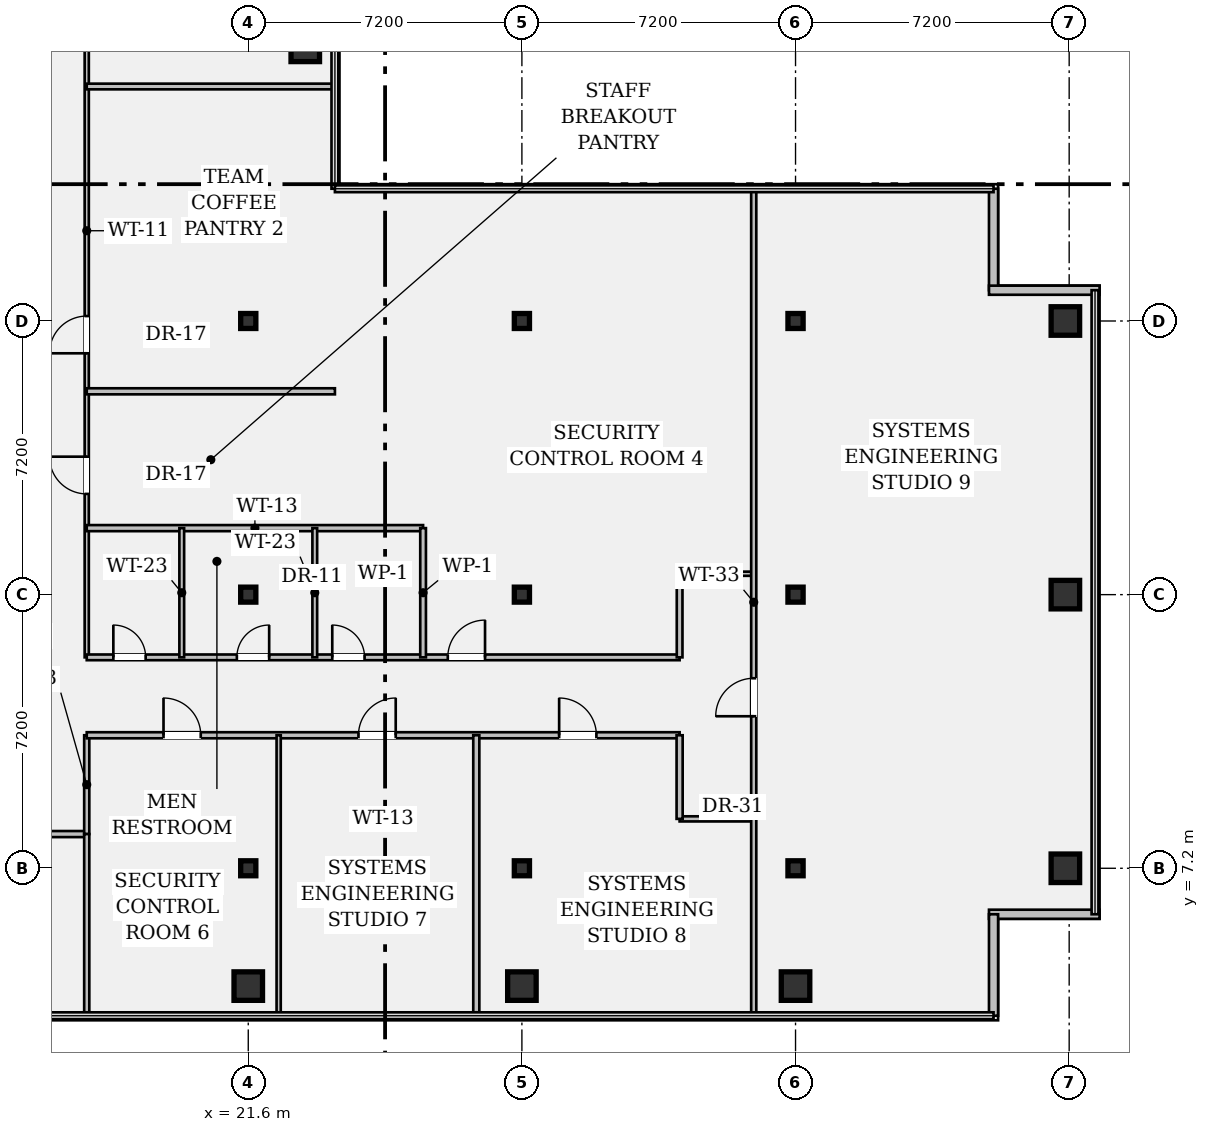
"""IFC4 building model, lengths in metres.
Left out: names, types, materials, properties, quantities, classifications, styles, units other than length and angle.
Written with IfcOpenShell. Run it as: python <this file> out.ifc"""

import sys

from ifc_helpers import new_model, si_unit, direction, frame, frame_2d, origin, origin_2d, place, context, subcontext, project, spatial, rectangle, hollow_rectangle, i_section, extrude, element, fill, save


model = new_model("IFC4")
c1 = context("Model", 3, precision=1e-05, world=origin(), true_north=direction((0.0, 1.0)))
c2 = subcontext(c1, "Body", "Model", "MODEL_VIEW")
j1 = project(units=[si_unit("LENGTHUNIT", "METRE"), si_unit("PLANEANGLEUNIT", "RADIAN")], contexts=[c1])
p1 = place(None, origin())
s1 = spatial("IfcSite", under=j1, at=p1, CompositionType="ELEMENT")
p2 = place(p1, origin())
s2 = spatial("IfcBuilding", under=s1, at=p2, CompositionType="ELEMENT")
p3 = place(p2, frame((0.0, 0.0, 218.75)))
s3 = spatial("IfcBuildingStorey", under=s2, at=p3, CompositionType="ELEMENT", Elevation=218.75)
p4 = place(p3, frame((21.6, 4.1, 0.0), z_axis=(0.0, 0.0, 1.0), x_axis=(1.0, 0.0, 0.0)))
e1 = element("IfcColumn", 1, at=p4, inside=s3, PredefinedType="COLUMN", context=c2, shape_type="SweptSolid", body=[
    extrude(hollow_rectangle(XDim=0.75, YDim=0.75, WallThickness=0.045, at=origin_2d()), origin(), (0.0, 0.0, 1.0), 3.24),
])
for number, where, z_axis, x_axis in (
    (2, (21.6, 7.2, 0.0), (0.0, 0.0, 1.0), (1.0, 0.0, 0.0)),
    (3, (21.6, 14.4, 0.0), (0.0, 0.0, 1.0), (1.0, 0.0, 0.0)),
    (4, (21.6, 21.6, 0.0), (0.0, 0.0, 1.0), (1.0, 0.0, 0.0)),
):
    element("IfcColumn", number, at=place(p3, frame(where, z_axis=z_axis, x_axis=x_axis)), inside=s3, PredefinedType="COLUMN", context=c2, shape_type="SweptSolid", body=[
        extrude(i_section(OverallWidth=0.399, OverallDepth=0.394, WebThickness=0.023, FlangeThickness=0.037, FilletRadius=0.018, at=origin_2d()), origin(), (0.0, 0.0, 1.0), 3.24),
    ])
for number, where, z_axis, x_axis in (
    (5, (23.1, 28.8, 0.0), (0.0, 0.0, 1.0), (1.0, 0.0, 0.0)),
    (6, (28.8, 4.1, 0.0), (0.0, 0.0, 1.0), (1.0, 0.0, 0.0)),
):
    element("IfcColumn", number, at=place(p3, frame(where, z_axis=z_axis, x_axis=x_axis)), inside=s3, PredefinedType="COLUMN", context=c2, shape_type="SweptSolid", body=[
        extrude(hollow_rectangle(XDim=0.75, YDim=0.75, WallThickness=0.045, at=origin_2d()), origin(), (0.0, 0.0, 1.0), 3.24),
    ])
for number, where, z_axis, x_axis in (
    (7, (28.8, 7.2, 0.0), (0.0, 0.0, 1.0), (1.0, 0.0, 0.0)),
    (8, (28.8, 14.4, 0.0), (0.0, 0.0, 1.0), (1.0, 0.0, 0.0)),
    (9, (28.8, 21.6, 0.0), (0.0, 0.0, 1.0), (1.0, 0.0, 0.0)),
):
    element("IfcColumn", number, at=place(p3, frame(where, z_axis=z_axis, x_axis=x_axis)), inside=s3, PredefinedType="COLUMN", context=c2, shape_type="SweptSolid", body=[
        extrude(i_section(OverallWidth=0.399, OverallDepth=0.394, WebThickness=0.023, FlangeThickness=0.037, FilletRadius=0.018, at=origin_2d()), origin(), (0.0, 0.0, 1.0), 3.24),
    ])
p5 = place(p3, frame((36.0, 4.1, 0.0), z_axis=(0.0, 0.0, 1.0), x_axis=(1.0, 0.0, 0.0)))
e10 = element("IfcColumn", 10, at=p5, inside=s3, PredefinedType="COLUMN", context=c2, shape_type="SweptSolid", body=[
    extrude(hollow_rectangle(XDim=0.75, YDim=0.75, WallThickness=0.045, at=origin_2d()), origin(), (0.0, 0.0, 1.0), 3.24),
])
for number, where, z_axis, x_axis in (
    (11, (36.0, 7.2, 0.0), (0.0, 0.0, 1.0), (1.0, 0.0, 0.0)),
    (12, (36.0, 14.4, 0.0), (0.0, 0.0, 1.0), (1.0, 0.0, 0.0)),
    (13, (36.0, 21.6, 0.0), (0.0, 0.0, 1.0), (1.0, 0.0, 0.0)),
):
    element("IfcColumn", number, at=place(p3, frame(where, z_axis=z_axis, x_axis=x_axis)), inside=s3, PredefinedType="COLUMN", context=c2, shape_type="SweptSolid", body=[
        extrude(i_section(OverallWidth=0.399, OverallDepth=0.394, WebThickness=0.023, FlangeThickness=0.037, FilletRadius=0.018, at=origin_2d()), origin(), (0.0, 0.0, 1.0), 3.24),
    ])
for number, where, z_axis, x_axis in (
    (14, (43.1, 7.2, 0.0), (0.0, 0.0, 1.0), (1.0, 0.0, 0.0)),
    (15, (43.1, 14.4, 0.0), (0.0, 0.0, 1.0), (1.0, 0.0, 0.0)),
    (16, (43.1, 21.6, 0.0), (0.0, 0.0, 1.0), (1.0, 0.0, 0.0)),
):
    element("IfcColumn", number, at=place(p3, frame(where, z_axis=z_axis, x_axis=x_axis)), inside=s3, PredefinedType="COLUMN", context=c2, shape_type="SweptSolid", body=[
        extrude(hollow_rectangle(XDim=0.75, YDim=0.75, WallThickness=0.045, at=origin_2d()), origin(), (0.0, 0.0, 1.0), 3.24),
    ])
p6 = place(p3, frame((41.21, 25.08, 0.0), z_axis=(0.0, 0.0, 1.0), x_axis=(0.0, -1.0, 0.0)))
e17 = element("IfcWall", 17, at=p6, inside=s3, PredefinedType="STANDARD", context=c2, shape_type="SweptSolid", body=[
    extrude(rectangle(XDim=2.67, YDim=0.24, at=frame_2d((1.335, 0.0))), origin(), (0.0, 0.0, 1.0), 3.24),
])
for number, where, z_axis, x_axis in (
    (18, (41.09, 22.41, 0.0), (0.0, 0.0, 1.0), (1.0, 0.0, 0.0)),
    (19, (44.0, 5.99, 0.0), (0.0, 0.0, 1.0), (-1.0, 0.0, 0.0)),
):
    element("IfcWall", number, at=place(p3, frame(where, z_axis=z_axis, x_axis=x_axis)), inside=s3, PredefinedType="STANDARD", context=c2, shape_type="SweptSolid", body=[
        extrude(rectangle(XDim=2.91, YDim=0.24, at=frame_2d((1.455, 0.0))), origin(), (0.0, 0.0, 1.0), 3.24),
    ])
p7 = place(p3, frame((41.21, 5.99, 0.0), z_axis=(0.0, 0.0, 1.0), x_axis=(0.0, -1.0, 0.0)))
e20 = element("IfcWall", 20, at=p7, inside=s3, PredefinedType="STANDARD", context=c2, shape_type="SweptSolid", body=[
    extrude(rectangle(XDim=2.67, YDim=0.24, at=frame_2d((1.335, 0.0))), origin(), (0.0, 0.0, 1.0), 3.24),
])
p8 = place(p3, frame((14.4, 8.1, 0.0), z_axis=(0.0, 0.0, 1.0), x_axis=(1.0, 0.0, 0.0)))
e21 = element("IfcWall", 21, at=p8, inside=s3, PredefinedType="PARTITIONING", context=c2, shape_type="SweptSolid", body=[
    extrude(rectangle(XDim=2.95, YDim=0.16, at=frame_2d((1.475, 0.0))), origin(), (0.0, 0.0, 1.0), 2.808),
])
p9 = place(p8, frame((0.95, 0.0, 0.0)))
e22 = element("IfcOpeningElement", 22, at=p9, cuts=e21, PredefinedType="OPENING", context=c2, shape_type="SweptSolid", body=[
    extrude(rectangle(XDim=0.98, YDim=2.15, at=frame_2d((0.49, 1.075))), frame((0.0, 0.092, 0.0), z_axis=(0.0, -1.0, 0.0), x_axis=(1.0, 0.0, 0.0)), (0.0, 0.0, 1.0), 0.184),
])
p10 = place(p3, frame((17.35, 8.1, 0.0), z_axis=(0.0, 0.0, 1.0), x_axis=(0.0, 1.0, 0.0)))
e23 = element("IfcWall", 23, at=p10, inside=s3, PredefinedType="PARTITIONING", context=c2, shape_type="SweptSolid", body=[
    extrude(rectangle(XDim=2.6, YDim=0.135, at=frame_2d((1.3, 0.0))), origin(), (0.0, 0.0, 1.0), 3.24),
])
p11 = place(p3, frame((17.35, 12.75, 0.0), z_axis=(0.0, 0.0, 1.0), x_axis=(0.0, 1.0, 0.0)))
e24 = element("IfcWall", 24, at=p11, inside=s3, PredefinedType="PARTITIONING", context=c2, shape_type="SweptSolid", body=[
    extrude(rectangle(XDim=22.45, YDim=0.11, at=frame_2d((11.225, 0.0))), origin(), (0.0, 0.0, 1.0), 2.613),
])
p12 = place(p11, frame((4.3, 0.0, 0.0)))
e25 = element("IfcOpeningElement", 25, at=p12, cuts=e24, PredefinedType="OPENING", context=c2, shape_type="SweptSolid", body=[
    extrude(rectangle(XDim=0.98, YDim=2.15, at=frame_2d((0.49, 1.075))), frame((0.0, 0.067, 0.0), z_axis=(0.0, -1.0, 0.0), x_axis=(1.0, 0.0, 0.0)), (0.0, 0.0, 1.0), 0.134),
])
p13 = place(p11, frame((8.0, 0.0, 0.0)))
e26 = element("IfcOpeningElement", 26, at=p13, cuts=e24, PredefinedType="OPENING", context=c2, shape_type="SweptSolid", body=[
    extrude(rectangle(XDim=0.98, YDim=2.15, at=frame_2d((0.49, 1.075))), frame((0.0, 0.067, 0.0), z_axis=(0.0, -1.0, 0.0), x_axis=(1.0, 0.0, 0.0)), (0.0, 0.0, 1.0), 0.134),
])
p14 = place(p11, frame((16.02, 0.0, 0.0)))
e27 = element("IfcOpeningElement", 27, at=p14, cuts=e24, PredefinedType="OPENING", context=c2, shape_type="SweptSolid", body=[
    extrude(rectangle(XDim=0.98, YDim=2.15, at=frame_2d((0.49, 1.075))), frame((0.0, 0.067, 0.0), z_axis=(0.0, -1.0, 0.0), x_axis=(1.0, 0.0, 0.0)), (0.0, 0.0, 1.0), 0.134),
])
p15 = place(p3, frame((17.35, 10.7, 0.0), z_axis=(0.0, 0.0, 1.0), x_axis=(1.0, 0.0, 0.0)))
e28 = element("IfcWall", 28, at=p15, inside=s3, PredefinedType="PARTITIONING", context=c2, shape_type="SweptSolid", body=[
    extrude(rectangle(XDim=15.6, YDim=0.16, at=frame_2d((7.8, 0.0))), origin(), (0.0, 0.0, 1.0), 2.613),
])
p16 = place(p15, frame((2.02, 0.0, 0.0)))
e29 = element("IfcOpeningElement", 29, at=p16, cuts=e28, PredefinedType="OPENING", context=c2, shape_type="SweptSolid", body=[
    extrude(rectangle(XDim=0.98, YDim=2.15, at=frame_2d((0.49, 1.075))), frame((0.0, 0.092, 0.0), z_axis=(0.0, -1.0, 0.0), x_axis=(1.0, 0.0, 0.0)), (0.0, 0.0, 1.0), 0.184),
])
p17 = place(p15, frame((7.15, 0.0, 0.0)))
e30 = element("IfcOpeningElement", 30, at=p17, cuts=e28, PredefinedType="OPENING", context=c2, shape_type="SweptSolid", body=[
    extrude(rectangle(XDim=0.98, YDim=2.15, at=frame_2d((0.49, 1.075))), frame((0.0, 0.092, 0.0), z_axis=(0.0, -1.0, 0.0), x_axis=(1.0, 0.0, 0.0)), (0.0, 0.0, 1.0), 0.184),
])
p18 = place(p15, frame((12.43, 0.0, 0.0)))
e31 = element("IfcOpeningElement", 31, at=p18, cuts=e28, PredefinedType="OPENING", context=c2, shape_type="SweptSolid", body=[
    extrude(rectangle(XDim=0.98, YDim=2.15, at=frame_2d((0.49, 1.075))), frame((0.0, 0.092, 0.0), z_axis=(0.0, -1.0, 0.0), x_axis=(1.0, 0.0, 0.0)), (0.0, 0.0, 1.0), 0.184),
])
p19 = place(p3, frame((17.35, 12.75, 0.0), z_axis=(0.0, 0.0, 1.0), x_axis=(1.0, 0.0, 0.0)))
e32 = element("IfcWall", 32, at=p19, inside=s3, PredefinedType="PARTITIONING", context=c2, shape_type="SweptSolid", body=[
    extrude(rectangle(XDim=15.6, YDim=0.15, at=frame_2d((7.8, 0.0))), origin(), (0.0, 0.0, 1.0), 2.613),
])
p20 = place(p19, frame((0.7, 0.0, 0.0)))
e33 = element("IfcOpeningElement", 33, at=p20, cuts=e32, PredefinedType="OPENING", context=c2, shape_type="SweptSolid", body=[
    extrude(rectangle(XDim=0.85, YDim=2.15, at=frame_2d((0.425, 1.075))), frame((0.0, 0.087, 0.0), z_axis=(0.0, -1.0, 0.0), x_axis=(1.0, 0.0, 0.0)), (0.0, 0.0, 1.0), 0.174),
])
p21 = place(p19, frame((3.95, 0.0, 0.0)))
e34 = element("IfcOpeningElement", 34, at=p21, cuts=e32, PredefinedType="OPENING", context=c2, shape_type="SweptSolid", body=[
    extrude(rectangle(XDim=0.85, YDim=2.15, at=frame_2d((0.425, 1.075))), frame((0.0, 0.087, 0.0), z_axis=(0.0, -1.0, 0.0), x_axis=(1.0, 0.0, 0.0)), (0.0, 0.0, 1.0), 0.174),
])
p22 = place(p19, frame((6.46, 0.0, 0.0)))
e35 = element("IfcOpeningElement", 35, at=p22, cuts=e32, PredefinedType="OPENING", context=c2, shape_type="SweptSolid", body=[
    extrude(rectangle(XDim=0.85, YDim=2.15, at=frame_2d((0.425, 1.075))), frame((0.0, 0.087, 0.0), z_axis=(0.0, -1.0, 0.0), x_axis=(1.0, 0.0, 0.0)), (0.0, 0.0, 1.0), 0.174),
])
p23 = place(p19, frame((9.5, 0.0, 0.0)))
e36 = element("IfcOpeningElement", 36, at=p23, cuts=e32, PredefinedType="OPENING", context=c2, shape_type="SweptSolid", body=[
    extrude(rectangle(XDim=0.98, YDim=2.15, at=frame_2d((0.49, 1.075))), frame((0.0, 0.087, 0.0), z_axis=(0.0, -1.0, 0.0), x_axis=(1.0, 0.0, 0.0)), (0.0, 0.0, 1.0), 0.174),
])
p24 = place(p3, frame((32.95, 8.5, 0.0), z_axis=(0.0, 0.0, 1.0), x_axis=(1.0, 0.0, 0.0)))
e37 = element("IfcWall", 37, at=p24, inside=s3, PredefinedType="PARTITIONING", context=c2, shape_type="SweptSolid", body=[
    extrude(rectangle(XDim=1.95, YDim=0.135, at=frame_2d((0.975, 0.0))), origin(), (0.0, 0.0, 1.0), 2.808),
])
p25 = place(p3, frame((32.95, 14.95, 0.0), z_axis=(0.0, 0.0, 1.0), x_axis=(1.0, 0.0, 0.0)))
e38 = element("IfcWall", 38, at=p25, inside=s3, PredefinedType="PARTITIONING", context=c2, shape_type="SweptSolid", body=[
    extrude(rectangle(XDim=1.95, YDim=0.11, at=frame_2d((0.975, 0.0))), origin(), (0.0, 0.0, 1.0), 2.808),
])
p26 = place(p3, frame((32.95, 8.5, 0.0), z_axis=(0.0, 0.0, 1.0), x_axis=(0.0, 1.0, 0.0)))
e39 = element("IfcWall", 39, at=p26, inside=s3, PredefinedType="PARTITIONING", context=c2, shape_type="SweptSolid", body=[
    extrude(rectangle(XDim=2.2, YDim=0.16, at=frame_2d((1.1, 0.0))), origin(), (0.0, 0.0, 1.0), 3.24),
])
p27 = place(p3, frame((32.95, 12.75, 0.0), z_axis=(0.0, 0.0, 1.0), x_axis=(0.0, 1.0, 0.0)))
e40 = element("IfcWall", 40, at=p27, inside=s3, PredefinedType="PARTITIONING", context=c2, shape_type="SweptSolid", body=[
    extrude(rectangle(XDim=2.2, YDim=0.15, at=frame_2d((1.1, 0.0))), origin(), (0.0, 0.0, 1.0), 2.613),
])
p28 = place(p3, frame((34.9, 3.32, 0.0), z_axis=(0.0, 0.0, 1.0), x_axis=(0.0, 1.0, 0.0)))
e41 = element("IfcWall", 41, at=p28, inside=s3, PredefinedType="PARTITIONING", context=c2, shape_type="SweptSolid", body=[
    extrude(rectangle(XDim=21.76, YDim=0.135, at=frame_2d((10.88, 0.0))), origin(), (0.0, 0.0, 1.0), 2.613),
])
p29 = place(p28, frame((7.88, 0.0, 0.0)))
e42 = element("IfcOpeningElement", 42, at=p29, cuts=e41, PredefinedType="OPENING", context=c2, shape_type="SweptSolid", body=[
    extrude(rectangle(XDim=1.0, YDim=2.15, at=frame_2d((0.5, 1.075))), frame((0.0, 0.08, 0.0), z_axis=(0.0, -1.0, 0.0), x_axis=(1.0, 0.0, 0.0)), (0.0, 0.0, 1.0), 0.159),
])
p30 = place(p3, frame((17.35, 16.15, 0.0), z_axis=(0.0, 0.0, 1.0), x_axis=(1.0, 0.0, 0.0)))
e43 = element("IfcWall", 43, at=p30, inside=s3, PredefinedType="PARTITIONING", context=c2, shape_type="SweptSolid", body=[
    extrude(rectangle(XDim=8.85, YDim=0.16, at=frame_2d((4.425, 0.0))), origin(), (0.0, 0.0, 1.0), 2.613),
])
p31 = place(p3, frame((26.2, 12.75, 0.0), z_axis=(0.0, 0.0, 1.0), x_axis=(0.0, 1.0, 0.0)))
e44 = element("IfcWall", 44, at=p31, inside=s3, PredefinedType="PARTITIONING", context=c2, shape_type="SweptSolid", body=[
    extrude(rectangle(XDim=3.4, YDim=0.15, at=frame_2d((1.7, 0.0))), origin(), (0.0, 0.0, 1.0), 2.613),
])
for number, where, z_axis, x_axis in (
    (45, (19.85, 12.75, 0.0), (0.0, 0.0, 1.0), (0.0, 1.0, 0.0)),
    (46, (23.35, 12.75, 0.0), (0.0, 0.0, 1.0), (0.0, 1.0, 0.0)),
):
    element("IfcWall", number, at=place(p3, frame(where, z_axis=z_axis, x_axis=x_axis)), inside=s3, PredefinedType="PARTITIONING", context=c2, shape_type="SweptSolid", body=[
        extrude(rectangle(XDim=3.4, YDim=0.125, at=frame_2d((1.7, 0.0))), origin(), (0.0, 0.0, 1.0), 2.613),
    ])
p32 = place(p3, frame((17.35, 19.75, 0.0), z_axis=(0.0, 0.0, 1.0), x_axis=(1.0, 0.0, 0.0)))
e47 = element("IfcWall", 47, at=p32, inside=s3, PredefinedType="PARTITIONING", context=c2, shape_type="SweptSolid", body=[
    extrude(rectangle(XDim=6.53, YDim=0.16, at=frame_2d((3.265, 0.0))), origin(), (0.0, 0.0, 1.0), 2.613),
])
p33 = place(p3, frame((17.35, 27.77, 0.0), z_axis=(0.0, 0.0, 1.0), x_axis=(1.0, 0.0, 0.0)))
e48 = element("IfcWall", 48, at=p33, inside=s3, PredefinedType="PARTITIONING", context=c2, shape_type="SweptSolid", body=[
    extrude(rectangle(XDim=6.53, YDim=0.15, at=frame_2d((3.265, 0.0))), origin(), (0.0, 0.0, 1.0), 2.808),
])
p34 = place(p3, frame((17.35, 3.32, 0.0), z_axis=(0.0, 0.0, 1.0), x_axis=(0.0, 1.0, 0.0)))
e49 = element("IfcWall", 49, at=p34, inside=s3, PredefinedType="PARTITIONING", context=c2, shape_type="SweptSolid", body=[
    extrude(rectangle(XDim=4.78, YDim=0.135, at=frame_2d((2.39, 0.0))), origin(), (0.0, 0.0, 1.0), 2.613),
])
p35 = place(p3, frame((22.4, 3.32, 0.0), z_axis=(0.0, 0.0, 1.0), x_axis=(0.0, 1.0, 0.0)))
e50 = element("IfcWall", 50, at=p35, inside=s3, PredefinedType="PARTITIONING", context=c2, shape_type="SweptSolid", body=[
    extrude(rectangle(XDim=7.38, YDim=0.11, at=frame_2d((3.69, 0.0))), origin(), (0.0, 0.0, 1.0), 2.613),
])
p36 = place(p3, frame((27.6, 3.32, 0.0), z_axis=(0.0, 0.0, 1.0), x_axis=(0.0, 1.0, 0.0)))
e51 = element("IfcWall", 51, at=p36, inside=s3, PredefinedType="PARTITIONING", context=c2, shape_type="SweptSolid", body=[
    extrude(rectangle(XDim=7.38, YDim=0.16, at=frame_2d((3.69, 0.0))), origin(), (0.0, 0.0, 1.0), 2.613),
])
p37 = place(p20, origin())
e52 = element("IfcDoor", 52, at=p37, inside=s3, OperationType="SINGLE_SWING_LEFT", PredefinedType="DOOR", context=c2, shape_type="SweptSolid", body=[
    extrude(rectangle(XDim=0.85, YDim=2.15, at=frame_2d((0.425, 1.075))), frame((0.0, 0.025, 0.0), z_axis=(0.0, -1.0, 0.0), x_axis=(1.0, 0.0, 0.0)), (0.0, 0.0, 1.0), 0.05),
])
fill(e33, e52)
p38 = place(p21, origin())
e53 = element("IfcDoor", 53, at=p38, inside=s3, OperationType="SINGLE_SWING_RIGHT", PredefinedType="DOOR", context=c2, shape_type="SweptSolid", body=[
    extrude(rectangle(XDim=0.85, YDim=2.15, at=frame_2d((0.425, 1.075))), frame((0.0, 0.025, 0.0), z_axis=(0.0, -1.0, 0.0), x_axis=(1.0, 0.0, 0.0)), (0.0, 0.0, 1.0), 0.05),
])
fill(e34, e53)
p39 = place(p22, origin())
e54 = element("IfcDoor", 54, at=p39, inside=s3, OperationType="SINGLE_SWING_LEFT", PredefinedType="DOOR", context=c2, shape_type="SweptSolid", body=[
    extrude(rectangle(XDim=0.85, YDim=2.15, at=frame_2d((0.425, 1.075))), frame((0.0, 0.025, 0.0), z_axis=(0.0, -1.0, 0.0), x_axis=(1.0, 0.0, 0.0)), (0.0, 0.0, 1.0), 0.05),
])
fill(e35, e54)
p40 = place(p12, origin())
e55 = element("IfcDoor", 55, at=p40, inside=s3, OperationType="SINGLE_SWING_RIGHT", PredefinedType="DOOR", context=c2, shape_type="SweptSolid", body=[
    extrude(rectangle(XDim=0.98, YDim=2.15, at=frame_2d((0.49, 1.075))), frame((0.0, 0.025, 0.0), z_axis=(0.0, -1.0, 0.0), x_axis=(1.0, 0.0, 0.0)), (0.0, 0.0, 1.0), 0.05),
])
fill(e25, e55)
p41 = place(p13, origin())
e56 = element("IfcDoor", 56, at=p41, inside=s3, OperationType="SINGLE_SWING_LEFT", PredefinedType="DOOR", context=c2, shape_type="SweptSolid", body=[
    extrude(rectangle(XDim=0.98, YDim=2.15, at=frame_2d((0.49, 1.075))), frame((0.0, 0.025, 0.0), z_axis=(0.0, -1.0, 0.0), x_axis=(1.0, 0.0, 0.0)), (0.0, 0.0, 1.0), 0.05),
])
fill(e26, e56)
p42 = place(p23, origin())
e57 = element("IfcDoor", 57, at=p42, inside=s3, OperationType="SINGLE_SWING_RIGHT", PredefinedType="DOOR", context=c2, shape_type="SweptSolid", body=[
    extrude(rectangle(XDim=0.98, YDim=2.15, at=frame_2d((0.49, 1.075))), frame((0.0, 0.025, 0.0), z_axis=(0.0, -1.0, 0.0), x_axis=(1.0, 0.0, 0.0)), (0.0, 0.0, 1.0), 0.05),
])
fill(e36, e57)
p43 = place(p16, origin())
e58 = element("IfcDoor", 58, at=p43, inside=s3, OperationType="SINGLE_SWING_LEFT", PredefinedType="DOOR", context=c2, shape_type="SweptSolid", body=[
    extrude(rectangle(XDim=0.98, YDim=2.15, at=frame_2d((0.49, 1.075))), frame((0.0, 0.025, 0.0), z_axis=(0.0, -1.0, 0.0), x_axis=(1.0, 0.0, 0.0)), (0.0, 0.0, 1.0), 0.05),
])
fill(e29, e58)
p44 = place(p17, origin())
e59 = element("IfcDoor", 59, at=p44, inside=s3, OperationType="SINGLE_SWING_RIGHT", PredefinedType="DOOR", context=c2, shape_type="SweptSolid", body=[
    extrude(rectangle(XDim=0.98, YDim=2.15, at=frame_2d((0.49, 1.075))), frame((0.0, 0.025, 0.0), z_axis=(0.0, -1.0, 0.0), x_axis=(1.0, 0.0, 0.0)), (0.0, 0.0, 1.0), 0.05),
])
fill(e30, e59)
p45 = place(p18, origin())
e60 = element("IfcDoor", 60, at=p45, inside=s3, OperationType="SINGLE_SWING_LEFT", PredefinedType="DOOR", context=c2, shape_type="SweptSolid", body=[
    extrude(rectangle(XDim=0.98, YDim=2.15, at=frame_2d((0.49, 1.075))), frame((0.0, 0.025, 0.0), z_axis=(0.0, -1.0, 0.0), x_axis=(1.0, 0.0, 0.0)), (0.0, 0.0, 1.0), 0.05),
])
fill(e31, e60)
p46 = place(p29, origin())
e61 = element("IfcDoor", 61, at=p46, inside=s3, OperationType="SINGLE_SWING_LEFT", PredefinedType="DOOR", context=c2, shape_type="SweptSolid", body=[
    extrude(rectangle(XDim=1.0, YDim=2.15, at=frame_2d((0.5, 1.075))), frame((0.0, 0.025, 0.0), z_axis=(0.0, -1.0, 0.0), x_axis=(1.0, 0.0, 0.0)), (0.0, 0.0, 1.0), 0.05),
])
fill(e42, e61)
save(model, sys.argv[1])
